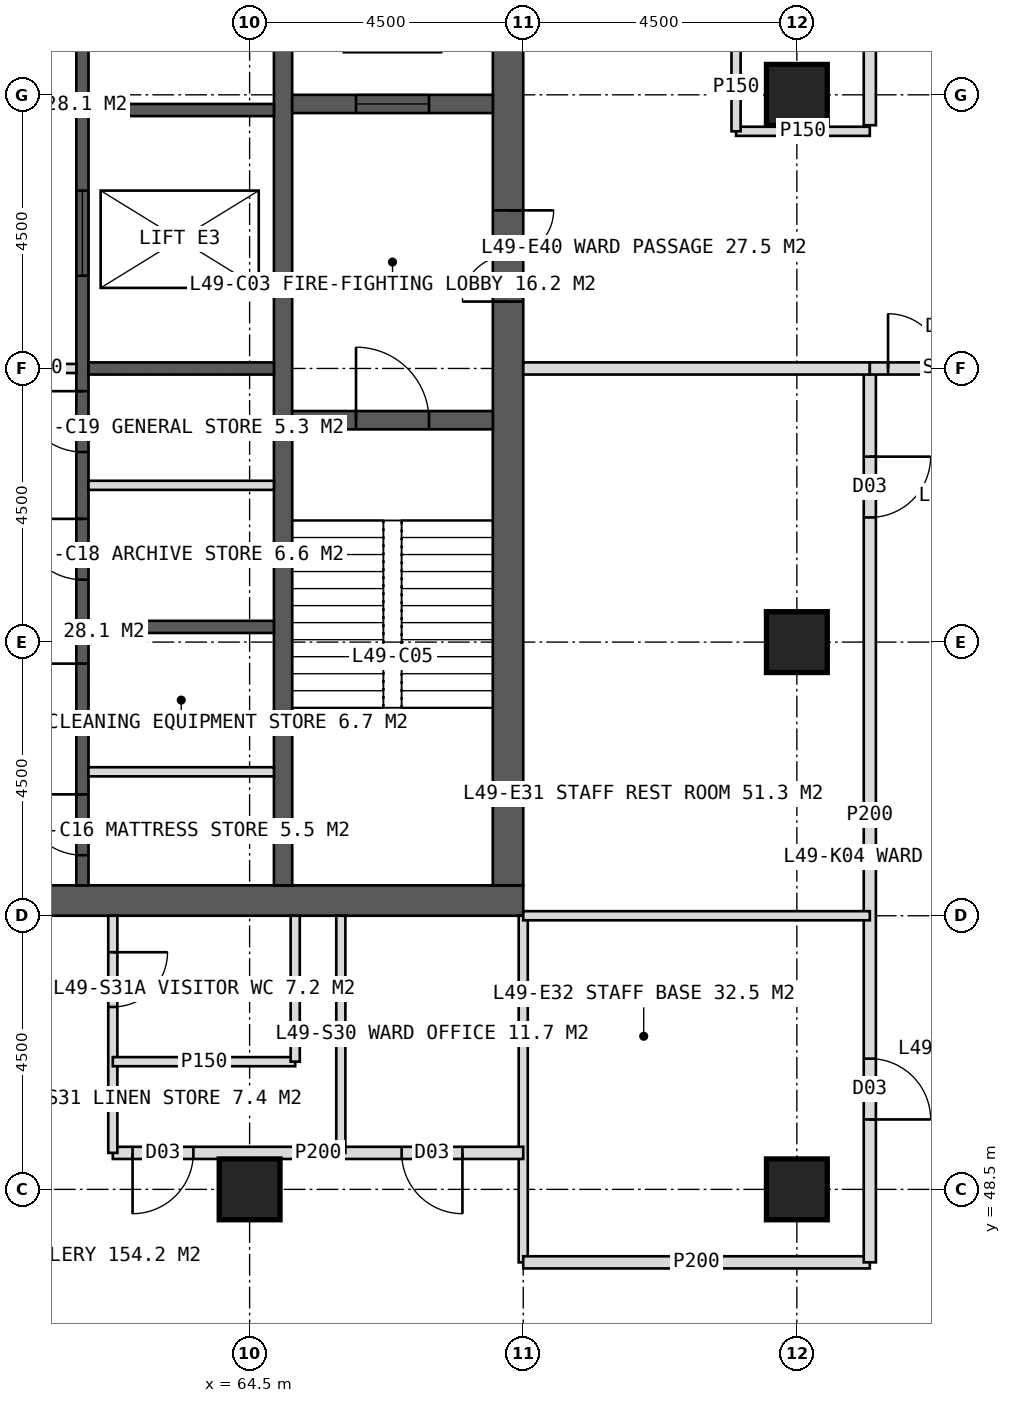
"""IFC4 building model, lengths in metres.
Left out: names, types, materials, properties, quantities, classifications, styles, units other than length and angle.
Written with IfcOpenShell. Run it as: python <this file> out.ifc"""

import sys

from ifc_helpers import new_model, si_unit, direction, frame, frame_2d, origin, origin_2d, place, context, subcontext, project, spatial, rectangle, hollow_rectangle, extrude, element, fill, save


model = new_model("IFC4")
c1 = context("Model", 3, precision=1e-05, world=origin(), true_north=direction((0.0, 1.0)))
c2 = subcontext(c1, "Body", "Model", "MODEL_VIEW")
j1 = project(units=[si_unit("LENGTHUNIT", "METRE"), si_unit("PLANEANGLEUNIT", "RADIAN")], contexts=[c1])
p1 = place(None, origin())
s1 = spatial("IfcSite", under=j1, at=p1, CompositionType="ELEMENT")
p2 = place(p1, origin())
s2 = spatial("IfcBuilding", under=s1, at=p2, CompositionType="ELEMENT")
p3 = place(p2, frame((0.0, 0.0, 205.0)))
s3 = spatial("IfcBuildingStorey", under=s2, at=p3, CompositionType="ELEMENT", Elevation=205.0)
p4 = place(p3, frame((51.0, 53.25, 0.0), z_axis=(0.0, 0.0, 1.0), x_axis=(1.0, 0.0, 0.0)))
e1 = element("IfcWall", 1, at=p4, inside=s3, PredefinedType="SHEAR", context=c2, shape_type="SweptSolid", body=[
    extrude(rectangle(XDim=18.0, YDim=0.5, at=frame_2d((9.0, 0.0))), origin(), (0.0, 0.0, 1.0), 4.0),
])
p5 = place(p4, frame((8.1, 0.0, 0.0)))
e2 = element("IfcOpeningElement", 2, at=p5, cuts=e1, PredefinedType="OPENING", context=c2, shape_type="SweptSolid", body=[
    extrude(rectangle(XDim=1.8, YDim=2.2, at=frame_2d((0.9, 1.1))), frame((0.0, 0.26, 0.0), z_axis=(0.0, -1.0, 0.0), x_axis=(1.0, 0.0, 0.0)), (0.0, 0.0, 1.0), 0.52),
])
p6 = place(p3, frame((68.75, 53.5, 0.0), z_axis=(0.0, 0.0, 1.0), x_axis=(0.0, 1.0, 0.0)))
e3 = element("IfcWall", 3, at=p6, inside=s3, PredefinedType="SHEAR", context=c2, shape_type="SweptSolid", body=[
    extrude(rectangle(XDim=17.0, YDim=0.5, at=frame_2d((8.5, 0.0))), origin(), (0.0, 0.0, 1.0), 4.0),
])
p7 = place(p6, frame((9.6, 0.0, 0.0)))
e4 = element("IfcOpeningElement", 4, at=p7, cuts=e3, PredefinedType="OPENING", context=c2, shape_type="SweptSolid", body=[
    extrude(rectangle(XDim=1.5, YDim=2.2, at=frame_2d((0.75, 1.1))), frame((0.0, 0.26, 0.0), z_axis=(0.0, -1.0, 0.0), x_axis=(1.0, 0.0, 0.0)), (0.0, 0.0, 1.0), 0.52),
])
p8 = place(p3, frame((65.05, 53.5, 0.0), z_axis=(0.0, 0.0, 1.0), x_axis=(0.0, 1.0, 0.0)))
e5 = element("IfcWall", 5, at=p8, inside=s3, PredefinedType="SHEAR", context=c2, shape_type="SweptSolid", body=[
    extrude(rectangle(XDim=17.0, YDim=0.3, at=frame_2d((8.5, 0.0))), origin(), (0.0, 0.0, 1.0), 4.0),
])
p9 = place(p3, frame((61.75, 53.5, 0.0), z_axis=(0.0, 0.0, 1.0), x_axis=(0.0, 1.0, 0.0)))
e6 = element("IfcWall", 6, at=p9, inside=s3, PredefinedType="SHEAR", context=c2, shape_type="SweptSolid", body=[
    extrude(rectangle(XDim=17.0, YDim=0.2, at=frame_2d((8.5, 0.0))), origin(), (0.0, 0.0, 1.0), 4.0),
])
p10 = place(p9, frame((0.496, 0.0, 0.0)))
e7 = element("IfcOpeningElement", 7, at=p10, cuts=e6, PredefinedType="OPENING", context=c2, shape_type="SweptSolid", body=[
    extrude(rectangle(XDim=1.0, YDim=2.1, at=frame_2d((0.5, 1.05))), frame((0.0, 0.11, 0.0), z_axis=(0.0, -1.0, 0.0), x_axis=(1.0, 0.0, 0.0)), (0.0, 0.0, 1.0), 0.22),
])
p11 = place(p9, frame((2.646, 0.0, 0.0)))
e8 = element("IfcOpeningElement", 8, at=p11, cuts=e6, PredefinedType="OPENING", context=c2, shape_type="SweptSolid", body=[
    extrude(rectangle(XDim=1.0, YDim=2.1, at=frame_2d((0.5, 1.05))), frame((0.0, 0.11, 0.0), z_axis=(0.0, -1.0, 0.0), x_axis=(1.0, 0.0, 0.0)), (0.0, 0.0, 1.0), 0.22),
])
p12 = place(p9, frame((5.027, 0.0, 0.0)))
e9 = element("IfcOpeningElement", 9, at=p12, cuts=e6, PredefinedType="OPENING", context=c2, shape_type="SweptSolid", body=[
    extrude(rectangle(XDim=1.0, YDim=2.1, at=frame_2d((0.5, 1.05))), frame((0.0, 0.11, 0.0), z_axis=(0.0, -1.0, 0.0), x_axis=(1.0, 0.0, 0.0)), (0.0, 0.0, 1.0), 0.22),
])
p13 = place(p9, frame((7.126, 0.0, 0.0)))
e10 = element("IfcOpeningElement", 10, at=p13, cuts=e6, PredefinedType="OPENING", context=c2, shape_type="SweptSolid", body=[
    extrude(rectangle(XDim=1.0, YDim=2.1, at=frame_2d((0.5, 1.05))), frame((0.0, 0.11, 0.0), z_axis=(0.0, -1.0, 0.0), x_axis=(1.0, 0.0, 0.0)), (0.0, 0.0, 1.0), 0.22),
])
p14 = place(p9, frame((10.025, 0.0, 0.0)))
e11 = element("IfcOpeningElement", 11, at=p14, cuts=e6, PredefinedType="OPENING", context=c2, shape_type="SweptSolid", body=[
    extrude(rectangle(XDim=1.4, YDim=2.2, at=frame_2d((0.7, 1.1))), frame((0.0, 0.11, 0.0), z_axis=(0.0, -1.0, 0.0), x_axis=(1.0, 0.0, 0.0)), (0.0, 0.0, 1.0), 0.22),
])
p15 = place(p9, frame((14.325, 0.0, 0.0)))
e12 = element("IfcOpeningElement", 12, at=p15, cuts=e6, PredefinedType="OPENING", context=c2, shape_type="SweptSolid", body=[
    extrude(rectangle(XDim=1.4, YDim=2.2, at=frame_2d((0.7, 1.1))), frame((0.0, 0.11, 0.0), z_axis=(0.0, -1.0, 0.0), x_axis=(1.0, 0.0, 0.0)), (0.0, 0.0, 1.0), 0.22),
])
for number, where, z_axis, x_axis in (
    (13, (61.85, 57.75, 0.0), (0.0, 0.0, 1.0), (1.0, 0.0, 0.0)),
    (14, (61.85, 62.0, 0.0), (0.0, 0.0, 1.0), (1.0, 0.0, 0.0)),
    (15, (61.85, 66.25, 0.0), (0.0, 0.0, 1.0), (1.0, 0.0, 0.0)),
):
    element("IfcWall", number, at=place(p3, frame(where, z_axis=z_axis, x_axis=x_axis)), inside=s3, PredefinedType="SHEAR", context=c2, shape_type="SweptSolid", body=[
        extrude(rectangle(XDim=3.05, YDim=0.2, at=frame_2d((1.525, 0.0))), origin(), (0.0, 0.0, 1.0), 4.0),
    ])
p16 = place(p3, frame((65.2, 61.15, 0.0), z_axis=(0.0, 0.0, 1.0), x_axis=(1.0, 0.0, 0.0)))
e16 = element("IfcWall", 16, at=p16, inside=s3, PredefinedType="SHEAR", context=c2, shape_type="SweptSolid", body=[
    extrude(rectangle(XDim=3.3, YDim=0.3, at=frame_2d((1.65, 0.0))), origin(), (0.0, 0.0, 1.0), 4.0),
])
p17 = place(p16, frame((1.05, 0.0, 0.0)))
e17 = element("IfcOpeningElement", 17, at=p17, cuts=e16, PredefinedType="OPENING", context=c2, shape_type="SweptSolid", body=[
    extrude(rectangle(XDim=1.2, YDim=2.1, at=frame_2d((0.6, 1.05))), frame((0.0, 0.16, 0.0), z_axis=(0.0, -1.0, 0.0), x_axis=(1.0, 0.0, 0.0)), (0.0, 0.0, 1.0), 0.32),
])
p18 = place(p3, frame((65.2, 66.35, 0.0), z_axis=(0.0, 0.0, 1.0), x_axis=(1.0, 0.0, 0.0)))
e18 = element("IfcWall", 18, at=p18, inside=s3, PredefinedType="SHEAR", context=c2, shape_type="SweptSolid", body=[
    extrude(rectangle(XDim=3.3, YDim=0.3, at=frame_2d((1.65, 0.0))), origin(), (0.0, 0.0, 1.0), 4.0),
])
p19 = place(p18, frame((1.05, 0.0, 0.0)))
e19 = element("IfcOpeningElement", 19, at=p19, cuts=e18, PredefinedType="OPENING", context=c2, shape_type="SweptSolid", body=[
    extrude(rectangle(XDim=1.2, YDim=2.2, at=frame_2d((0.6, 1.1))), frame((0.0, 0.16, 0.0), z_axis=(0.0, -1.0, 0.0), x_axis=(1.0, 0.0, 0.0)), (0.0, 0.0, 1.0), 0.32),
])
for number, where, z_axis, x_axis in (
    (20, (73.5, 48.5, 0.0), (0.0, 0.0, 1.0), (1.0, 0.0, 0.0)),
    (21, (64.5, 48.5, 0.0), (0.0, 0.0, 1.0), (1.0, 0.0, 0.0)),
    (22, (73.5, 57.5, 0.0), (0.0, 0.0, 1.0), (1.0, 0.0, 0.0)),
    (23, (73.5, 66.5, 0.0), (0.0, 0.0, 1.0), (1.0, 0.0, 0.0)),
):
    element("IfcColumn", number, at=place(p3, frame(where, z_axis=z_axis, x_axis=x_axis)), inside=s3, PredefinedType="COLUMN", context=c2, shape_type="SweptSolid", body=[
        extrude(hollow_rectangle(XDim=1.0, YDim=1.0, WallThickness=0.1, at=origin_2d()), origin(), (0.0, 0.0, 1.0), 4.0),
    ])
p20 = place(p3, frame((69.0, 53.0, 0.0), z_axis=(0.0, 0.0, 1.0), x_axis=(0.0, -1.0, 0.0)))
e24 = element("IfcWall", 24, at=p20, inside=s3, PredefinedType="PARTITIONING", context=c2, shape_type="SweptSolid", body=[
    extrude(rectangle(XDim=5.7, YDim=0.15, at=frame_2d((2.85, 0.0))), origin(), (0.0, 0.0, 1.0), 3.75),
])
p21 = place(p3, frame((74.7, 47.3, 0.0), z_axis=(0.0, 0.0, 1.0), x_axis=(-1.0, 0.0, 0.0)))
e25 = element("IfcWall", 25, at=p21, inside=s3, PredefinedType="PARTITIONING", context=c2, shape_type="SweptSolid", body=[
    extrude(rectangle(XDim=5.7, YDim=0.2, at=frame_2d((2.85, 0.0))), origin(), (0.0, 0.0, 1.0), 3.75),
])
p22 = place(p3, frame((69.0, 49.1, 0.0), z_axis=(0.0, 0.0, 1.0), x_axis=(-1.0, 0.0, 0.0)))
e26 = element("IfcWall", 26, at=p22, inside=s3, PredefinedType="PARTITIONING", context=c2, shape_type="SweptSolid", body=[
    extrude(rectangle(XDim=6.75, YDim=0.2, at=frame_2d((3.375, 0.0))), origin(), (0.0, 0.0, 1.0), 3.75),
])
p23 = place(p22, frame((1.0, 0.0, 0.0)))
e27 = element("IfcOpeningElement", 27, at=p23, cuts=e26, PredefinedType="OPENING", context=c2, shape_type="SweptSolid", body=[
    extrude(rectangle(XDim=1.0, YDim=2.1, at=frame_2d((0.5, 1.05))), frame((0.0, 0.11, 0.0), z_axis=(0.0, -1.0, 0.0), x_axis=(1.0, 0.0, 0.0)), (0.0, 0.0, 1.0), 0.22),
])
p24 = place(p22, frame((5.425, 0.0, 0.0)))
e28 = element("IfcOpeningElement", 28, at=p24, cuts=e26, PredefinedType="OPENING", context=c2, shape_type="SweptSolid", body=[
    extrude(rectangle(XDim=1.0, YDim=2.1, at=frame_2d((0.5, 1.05))), frame((0.0, 0.11, 0.0), z_axis=(0.0, -1.0, 0.0), x_axis=(1.0, 0.0, 0.0)), (0.0, 0.0, 1.0), 0.22),
])
p25 = place(p3, frame((62.25, 53.0, 0.0), z_axis=(0.0, 0.0, 1.0), x_axis=(0.0, -1.0, 0.0)))
e29 = element("IfcWall", 29, at=p25, inside=s3, PredefinedType="PARTITIONING", context=c2, shape_type="SweptSolid", body=[
    extrude(rectangle(XDim=3.9, YDim=0.15, at=frame_2d((1.95, 0.0))), origin(), (0.0, 0.0, 1.0), 3.75),
])
p26 = place(p25, frame((0.6, 0.0, 0.0)))
e30 = element("IfcOpeningElement", 30, at=p26, cuts=e29, PredefinedType="OPENING", context=c2, shape_type="SweptSolid", body=[
    extrude(rectangle(XDim=0.9, YDim=2.1, at=frame_2d((0.45, 1.05))), frame((0.0, 0.085, 0.0), z_axis=(0.0, -1.0, 0.0), x_axis=(1.0, 0.0, 0.0)), (0.0, 0.0, 1.0), 0.17),
])
p27 = place(p3, frame((66.0, 53.0, 0.0), z_axis=(0.0, 0.0, 1.0), x_axis=(0.0, -1.0, 0.0)))
e31 = element("IfcWall", 31, at=p27, inside=s3, PredefinedType="PARTITIONING", context=c2, shape_type="SweptSolid", body=[
    extrude(rectangle(XDim=3.9, YDim=0.15, at=frame_2d((1.95, 0.0))), origin(), (0.0, 0.0, 1.0), 3.75),
])
p28 = place(p3, frame((65.25, 50.6, 0.0), z_axis=(0.0, 0.0, 1.0), x_axis=(-1.0, 0.0, 0.0)))
e32 = element("IfcWall", 32, at=p28, inside=s3, PredefinedType="PARTITIONING", context=c2, shape_type="SweptSolid", body=[
    extrude(rectangle(XDim=3.0, YDim=0.15, at=frame_2d((1.5, 0.0))), origin(), (0.0, 0.0, 1.0), 3.75),
])
p29 = place(p3, frame((65.25, 53.0, 0.0), z_axis=(0.0, 0.0, 1.0), x_axis=(0.0, -1.0, 0.0)))
e33 = element("IfcWall", 33, at=p29, inside=s3, PredefinedType="PARTITIONING", context=c2, shape_type="SweptSolid", body=[
    extrude(rectangle(XDim=2.4, YDim=0.15, at=frame_2d((1.2, 0.0))), origin(), (0.0, 0.0, 1.0), 3.75),
])
p30 = place(p3, frame((74.7, 74.9, 0.0), z_axis=(0.0, 0.0, 1.0), x_axis=(0.0, -1.0, 0.0)))
e34 = element("IfcWall", 34, at=p30, inside=s3, PredefinedType="PARTITIONING", context=c2, shape_type="SweptSolid", body=[
    extrude(rectangle(XDim=8.9, YDim=0.2, at=frame_2d((4.45, 0.0))), origin(), (0.0, 0.0, 1.0), 3.75),
])
p31 = place(p30, frame((0.25, 0.0, 0.0)))
e35 = element("IfcOpeningElement", 35, at=p31, cuts=e34, PredefinedType="OPENING", context=c2, shape_type="SweptSolid", body=[
    extrude(rectangle(XDim=1.0, YDim=2.1, at=frame_2d((0.5, 1.05))), frame((0.0, 0.11, 0.0), z_axis=(0.0, -1.0, 0.0), x_axis=(1.0, 0.0, 0.0)), (0.0, 0.0, 1.0), 0.22),
])
p32 = place(p30, frame((5.9, 0.0, 0.0)))
e36 = element("IfcOpeningElement", 36, at=p32, cuts=e34, PredefinedType="OPENING", context=c2, shape_type="SweptSolid", body=[
    extrude(rectangle(XDim=1.0, YDim=2.1, at=frame_2d((0.5, 1.05))), frame((0.0, 0.11, 0.0), z_axis=(0.0, -1.0, 0.0), x_axis=(1.0, 0.0, 0.0)), (0.0, 0.0, 1.0), 0.22),
])
p33 = place(p3, frame((74.7, 62.0, 0.0), z_axis=(0.0, 0.0, 1.0), x_axis=(0.0, -1.0, 0.0)))
e37 = element("IfcWall", 37, at=p33, inside=s3, PredefinedType="PARTITIONING", context=c2, shape_type="SweptSolid", body=[
    extrude(rectangle(XDim=14.7, YDim=0.2, at=frame_2d((7.35, 0.0))), origin(), (0.0, 0.0, 1.0), 3.75),
])
p34 = place(p33, frame((1.45, 0.0, 0.0)))
e38 = element("IfcOpeningElement", 38, at=p34, cuts=e37, PredefinedType="OPENING", context=c2, shape_type="SweptSolid", body=[
    extrude(rectangle(XDim=1.0, YDim=2.1, at=frame_2d((0.5, 1.05))), frame((0.0, 0.11, 0.0), z_axis=(0.0, -1.0, 0.0), x_axis=(1.0, 0.0, 0.0)), (0.0, 0.0, 1.0), 0.22),
])
p35 = place(p33, frame((11.35, 0.0, 0.0)))
e39 = element("IfcOpeningElement", 39, at=p35, cuts=e37, PredefinedType="OPENING", context=c2, shape_type="SweptSolid", body=[
    extrude(rectangle(XDim=1.0, YDim=2.1, at=frame_2d((0.5, 1.05))), frame((0.0, 0.11, 0.0), z_axis=(0.0, -1.0, 0.0), x_axis=(1.0, 0.0, 0.0)), (0.0, 0.0, 1.0), 0.22),
])
p36 = place(p3, frame((72.5, 65.9, 0.0), z_axis=(0.0, 0.0, 1.0), x_axis=(1.0, 0.0, 0.0)))
e40 = element("IfcWall", 40, at=p36, inside=s3, PredefinedType="PARTITIONING", context=c2, shape_type="SweptSolid", body=[
    extrude(rectangle(XDim=2.2, YDim=0.15, at=frame_2d((1.1, 0.0))), origin(), (0.0, 0.0, 1.0), 3.75),
])
p37 = place(p3, frame((69.0, 62.0, 0.0), z_axis=(0.0, 0.0, 1.0), x_axis=(1.0, 0.0, 0.0)))
e41 = element("IfcWall", 41, at=p37, inside=s3, PredefinedType="SOLIDWALL", context=c2, shape_type="SweptSolid", body=[
    extrude(rectangle(XDim=5.7, YDim=0.2, at=frame_2d((2.85, 0.0))), origin(), (0.0, 0.0, 1.0), 2.95),
])
p38 = place(p3, frame((69.0, 53.0, 0.0), z_axis=(0.0, 0.0, 1.0), x_axis=(1.0, 0.0, 0.0)))
e42 = element("IfcWall", 42, at=p38, inside=s3, PredefinedType="PARTITIONING", context=c2, shape_type="SweptSolid", body=[
    extrude(rectangle(XDim=5.7, YDim=0.15, at=frame_2d((2.85, 0.0))), origin(), (0.0, 0.0, 1.0), 3.75),
])
p39 = place(p3, frame((74.7, 62.0, 0.0), z_axis=(0.0, 0.0, 1.0), x_axis=(1.0, 0.0, 0.0)))
e43 = element("IfcWall", 43, at=p39, inside=s3, PredefinedType="SOLIDWALL", context=c2, shape_type="SweptSolid", body=[
    extrude(rectangle(XDim=2.7, YDim=0.2, at=frame_2d((1.35, 0.0))), origin(), (0.0, 0.0, 1.0), 2.95),
])
p40 = place(p39, frame((0.3, 0.0, 0.0)))
e44 = element("IfcOpeningElement", 44, at=p40, cuts=e43, PredefinedType="OPENING", context=c2, shape_type="SweptSolid", body=[
    extrude(rectangle(XDim=1.8, YDim=2.2, at=frame_2d((0.9, 1.1))), frame((0.0, 0.11, 0.0), z_axis=(0.0, -1.0, 0.0), x_axis=(1.0, 0.0, 0.0)), (0.0, 0.0, 1.0), 0.22),
])
for number, where, z_axis, x_axis in (
    (45, (61.85, 55.367, 0.0), (0.0, 0.0, 1.0), (1.0, 0.0, 0.0)),
    (46, (61.85, 60.078, 0.0), (0.0, 0.0, 1.0), (1.0, 0.0, 0.0)),
):
    element("IfcWall", number, at=place(p3, frame(where, z_axis=z_axis, x_axis=x_axis)), inside=s3, PredefinedType="PARTITIONING", context=c2, shape_type="SweptSolid", body=[
        extrude(rectangle(XDim=3.05, YDim=0.15, at=frame_2d((1.525, 0.0))), origin(), (0.0, 0.0, 1.0), 3.75),
    ])
p41 = place(p3, frame((58.35, 62.0, 0.0), z_axis=(0.0, 0.0, 1.0), x_axis=(1.0, 0.0, 0.0)))
e47 = element("IfcWall", 47, at=p41, inside=s3, PredefinedType="PARTITIONING", context=c2, shape_type="SweptSolid", body=[
    extrude(rectangle(XDim=3.3, YDim=0.15, at=frame_2d((1.65, 0.0))), origin(), (0.0, 0.0, 1.0), 3.75),
])
p42 = place(p3, frame((72.5, 65.9, 0.0), z_axis=(0.0, 0.0, 1.0), x_axis=(0.0, 1.0, 0.0)))
e48 = element("IfcWall", 48, at=p42, inside=s3, PredefinedType="PARTITIONING", context=c2, shape_type="SweptSolid", body=[
    extrude(rectangle(XDim=1.45, YDim=0.15, at=frame_2d((0.725, 0.0))), origin(), (0.0, 0.0, 1.0), 3.75),
])
p43 = place(p23, origin())
e49 = element("IfcDoor", 49, at=p43, inside=s3, OperationType="SINGLE_SWING_LEFT", PredefinedType="DOOR", context=c2, shape_type="SweptSolid", body=[
    extrude(rectangle(XDim=1.0, YDim=2.1, at=frame_2d((0.5, 1.05))), frame((0.0, 0.025, 0.0), z_axis=(0.0, -1.0, 0.0), x_axis=(1.0, 0.0, 0.0)), (0.0, 0.0, 1.0), 0.05),
])
fill(e27, e49)
p44 = place(p26, origin())
e50 = element("IfcDoor", 50, at=p44, inside=s3, OperationType="SINGLE_SWING_LEFT", PredefinedType="DOOR", context=c2, shape_type="SweptSolid", body=[
    extrude(rectangle(XDim=0.9, YDim=2.1, at=frame_2d((0.45, 1.05))), frame((0.0, 0.025, 0.0), z_axis=(0.0, -1.0, 0.0), x_axis=(1.0, 0.0, 0.0)), (0.0, 0.0, 1.0), 0.05),
])
fill(e30, e50)
p45 = place(p24, origin())
e51 = element("IfcDoor", 51, at=p45, inside=s3, OperationType="SINGLE_SWING_RIGHT", PredefinedType="DOOR", context=c2, shape_type="SweptSolid", body=[
    extrude(rectangle(XDim=1.0, YDim=2.1, at=frame_2d((0.5, 1.05))), frame((0.0, 0.025, 0.0), z_axis=(0.0, -1.0, 0.0), x_axis=(1.0, 0.0, 0.0)), (0.0, 0.0, 1.0), 0.05),
])
fill(e28, e51)
p46 = place(p34, origin())
e52 = element("IfcDoor", 52, at=p46, inside=s3, OperationType="SINGLE_SWING_LEFT", PredefinedType="DOOR", context=c2, shape_type="SweptSolid", body=[
    extrude(rectangle(XDim=1.0, YDim=2.1, at=frame_2d((0.5, 1.05))), frame((0.0, 0.025, 0.0), z_axis=(0.0, -1.0, 0.0), x_axis=(1.0, 0.0, 0.0)), (0.0, 0.0, 1.0), 0.05),
])
fill(e38, e52)
p47 = place(p35, origin())
e53 = element("IfcDoor", 53, at=p47, inside=s3, OperationType="SINGLE_SWING_RIGHT", PredefinedType="DOOR", context=c2, shape_type="SweptSolid", body=[
    extrude(rectangle(XDim=1.0, YDim=2.1, at=frame_2d((0.5, 1.05))), frame((0.0, 0.025, 0.0), z_axis=(0.0, -1.0, 0.0), x_axis=(1.0, 0.0, 0.0)), (0.0, 0.0, 1.0), 0.05),
])
fill(e39, e53)
p48 = place(p40, origin())
e54 = element("IfcDoor", 54, at=p48, inside=s3, OperationType="DOUBLE_DOOR_DOUBLE_SWING", PredefinedType="DOOR", context=c2, shape_type="SweptSolid", body=[
    extrude(rectangle(XDim=1.8, YDim=2.2, at=frame_2d((0.9, 1.1))), frame((0.0, 0.025, 0.0), z_axis=(0.0, -1.0, 0.0), x_axis=(1.0, 0.0, 0.0)), (0.0, 0.0, 1.0), 0.05),
])
fill(e44, e54)
p49 = place(p7, origin())
e55 = element("IfcDoor", 55, at=p49, inside=s3, OperationType="DOUBLE_DOOR_SINGLE_SWING", PredefinedType="DOOR", context=c2, shape_type="SweptSolid", body=[
    extrude(rectangle(XDim=1.5, YDim=2.2, at=frame_2d((0.75, 1.1))), frame((0.0, 0.025, 0.0), z_axis=(0.0, -1.0, 0.0), x_axis=(1.0, 0.0, 0.0)), (0.0, 0.0, 1.0), 0.05),
])
fill(e4, e55)
p50 = place(p17, origin())
e56 = element("IfcDoor", 56, at=p50, inside=s3, OperationType="SINGLE_SWING_LEFT", PredefinedType="DOOR", context=c2, shape_type="SweptSolid", body=[
    extrude(rectangle(XDim=1.2, YDim=2.1, at=frame_2d((0.6, 1.05))), frame((0.0, 0.025, 0.0), z_axis=(0.0, -1.0, 0.0), x_axis=(1.0, 0.0, 0.0)), (0.0, 0.0, 1.0), 0.05),
])
fill(e17, e56)
p51 = place(p19, origin())
e57 = element("IfcDoor", 57, at=p51, inside=s3, OperationType="SLIDING_TO_LEFT", PredefinedType="DOOR", context=c2, shape_type="SweptSolid", body=[
    extrude(rectangle(XDim=1.2, YDim=2.2, at=frame_2d((0.6, 1.1))), frame((0.0, 0.025, 0.0), z_axis=(0.0, -1.0, 0.0), x_axis=(1.0, 0.0, 0.0)), (0.0, 0.0, 1.0), 0.05),
])
fill(e19, e57)
p52 = place(p10, origin())
e58 = element("IfcDoor", 58, at=p52, inside=s3, OperationType="SINGLE_SWING_RIGHT", PredefinedType="DOOR", context=c2, shape_type="SweptSolid", body=[
    extrude(rectangle(XDim=1.0, YDim=2.1, at=frame_2d((0.5, 1.05))), frame((0.0, 0.025, 0.0), z_axis=(0.0, -1.0, 0.0), x_axis=(1.0, 0.0, 0.0)), (0.0, 0.0, 1.0), 0.05),
])
fill(e7, e58)
p53 = place(p11, origin())
e59 = element("IfcDoor", 59, at=p53, inside=s3, OperationType="SINGLE_SWING_RIGHT", PredefinedType="DOOR", context=c2, shape_type="SweptSolid", body=[
    extrude(rectangle(XDim=1.0, YDim=2.1, at=frame_2d((0.5, 1.05))), frame((0.0, 0.025, 0.0), z_axis=(0.0, -1.0, 0.0), x_axis=(1.0, 0.0, 0.0)), (0.0, 0.0, 1.0), 0.05),
])
fill(e8, e59)
p54 = place(p12, origin())
e60 = element("IfcDoor", 60, at=p54, inside=s3, OperationType="SINGLE_SWING_RIGHT", PredefinedType="DOOR", context=c2, shape_type="SweptSolid", body=[
    extrude(rectangle(XDim=1.0, YDim=2.1, at=frame_2d((0.5, 1.05))), frame((0.0, 0.025, 0.0), z_axis=(0.0, -1.0, 0.0), x_axis=(1.0, 0.0, 0.0)), (0.0, 0.0, 1.0), 0.05),
])
fill(e9, e60)
p55 = place(p13, origin())
e61 = element("IfcDoor", 61, at=p55, inside=s3, OperationType="SINGLE_SWING_RIGHT", PredefinedType="DOOR", context=c2, shape_type="SweptSolid", body=[
    extrude(rectangle(XDim=1.0, YDim=2.1, at=frame_2d((0.5, 1.05))), frame((0.0, 0.025, 0.0), z_axis=(0.0, -1.0, 0.0), x_axis=(1.0, 0.0, 0.0)), (0.0, 0.0, 1.0), 0.05),
])
fill(e10, e61)
p56 = place(p14, origin())
e62 = element("IfcDoor", 62, at=p56, inside=s3, OperationType="SLIDING_TO_LEFT", PredefinedType="DOOR", context=c2, shape_type="SweptSolid", body=[
    extrude(rectangle(XDim=1.4, YDim=2.2, at=frame_2d((0.7, 1.1))), frame((0.0, 0.025, 0.0), z_axis=(0.0, -1.0, 0.0), x_axis=(1.0, 0.0, 0.0)), (0.0, 0.0, 1.0), 0.05),
])
fill(e11, e62)
save(model, sys.argv[1])
